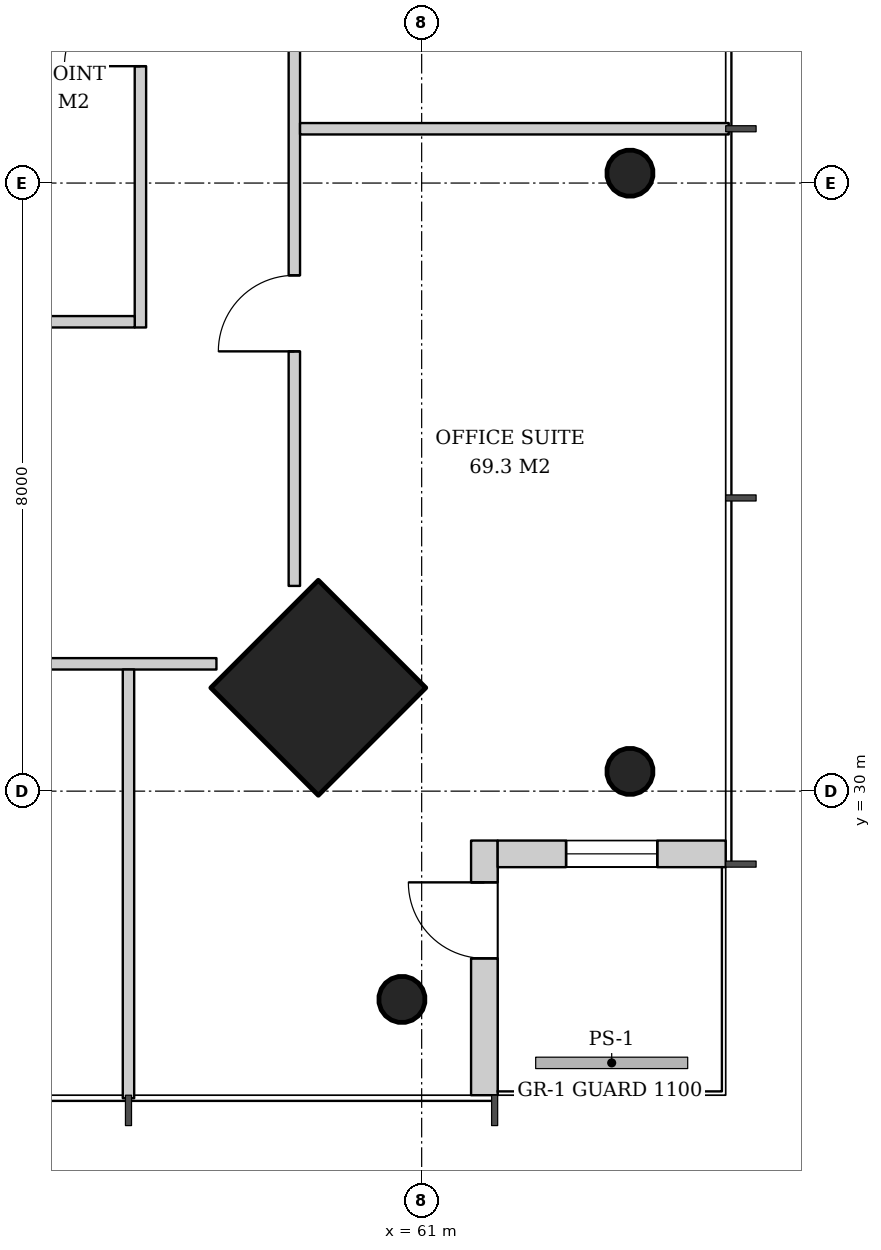
"""IFC4 building model, lengths in metres.
Left out: names, types, materials, properties, quantities, classifications, styles, units other than length and angle.
Written with IfcOpenShell. Run it as: python <this file> out.ifc"""

import sys

from ifc_helpers import new_model, si_unit, direction, frame, frame_2d, origin, origin_2d, place, context, subcontext, project, spatial, rectangle, hollow_circle, extrude, element, fill, save


model = new_model("IFC4")
c1 = context("Model", 3, precision=1e-05, world=origin(), true_north=direction((0.0, 1.0)))
c2 = subcontext(c1, "Body", "Model", "MODEL_VIEW")
j1 = project(units=[si_unit("LENGTHUNIT", "METRE"), si_unit("PLANEANGLEUNIT", "RADIAN")], contexts=[c1])
p1 = place(None, origin())
s1 = spatial("IfcSite", under=j1, at=p1, CompositionType="ELEMENT")
p2 = place(p1, origin())
s2 = spatial("IfcBuilding", under=s1, at=p2, CompositionType="ELEMENT")
p3 = place(p2, frame((0.0, 0.0, 184.4)))
s3 = spatial("IfcBuildingStorey", under=s2, at=p3, CompositionType="ELEMENT", Elevation=184.4)
p4 = place(p3, frame((63.779, 30.221, 0.0), z_axis=(-0.031898107953, 0.031898107953, 0.998981992539), x_axis=(-0.707106781187, -0.707106781187, 0.0)))
e1 = element("IfcColumn", 1, at=p4, inside=s3, PredefinedType="COLUMN", context=c2, shape_type="SweptSolid", body=[
    extrude(hollow_circle(Radius=0.305, WallThickness=0.025, at=origin_2d()), origin(), (0.0, 0.0, 1.0), 3.804),
])
p5 = place(p3, frame((63.779, 38.111, 0.0), z_axis=(-0.031910269556, 0.015987237665, 0.999362868496), x_axis=(-0.447933021895, -0.894067115991, 0.0)))
e2 = element("IfcColumn", 2, at=p5, inside=s3, PredefinedType="COLUMN", context=c2, shape_type="SweptSolid", body=[
    extrude(hollow_circle(Radius=0.305, WallThickness=0.025, at=origin_2d()), origin(), (0.0, 0.0, 1.0), 3.802),
])
p6 = place(p3, frame((59.678, 31.322, 0.0), z_axis=(-0.031898107953, 0.031898107953, 0.998981992539), x_axis=(-0.707106781187, -0.707106781187, 0.0)))
e3 = element("IfcColumn", 3, at=p6, inside=s3, PredefinedType="COLUMN", context=c2, shape_type="SweptSolid", body=[
    extrude(rectangle(XDim=2.0, YDim=2.0, at=origin_2d()), origin(), (0.0, 0.0, 1.0), 3.804),
])
p7 = place(p3, frame((60.779, 27.221, 0.0), z_axis=(-0.031898107953, 0.031898107953, 0.998981992539), x_axis=(-0.707106781187, -0.707106781187, 0.0)))
e4 = element("IfcColumn", 4, at=p7, inside=s3, PredefinedType="COLUMN", context=c2, shape_type="SweptSolid", body=[
    extrude(hollow_circle(Radius=0.305, WallThickness=0.025, at=origin_2d()), origin(), (0.0, 0.0, 1.0), 3.804),
])
p8 = place(p3, frame((61.825, 26.0, 0.0), z_axis=(0.0, 0.0, 1.0), x_axis=(0.0, 1.0, 0.0)))
e5 = element("IfcWall", 5, at=p8, inside=s3, PredefinedType="SOLIDWALL", context=c2, shape_type="SweptSolid", body=[
    extrude(rectangle(XDim=3.35, YDim=0.35, at=frame_2d((1.675, 0.0))), origin(), (0.0, 0.0, 1.0), 3.62),
])
p9 = place(p8, frame((1.8, 0.0, 0.0)))
e6 = element("IfcOpeningElement", 6, at=p9, cuts=e5, PredefinedType="OPENING", context=c2, shape_type="SweptSolid", body=[
    extrude(rectangle(XDim=1.0, YDim=2.4, at=frame_2d((0.5, 1.2))), frame((0.0, 0.185, 0.0), z_axis=(0.0, -1.0, 0.0), x_axis=(1.0, 0.0, 0.0)), (0.0, 0.0, 1.0), 0.37),
])
p10 = place(p3, frame((62.0, 29.175, 0.0), z_axis=(0.0, 0.0, 1.0), x_axis=(1.0, 0.0, 0.0)))
e7 = element("IfcWall", 7, at=p10, inside=s3, PredefinedType="SOLIDWALL", context=c2, shape_type="SweptSolid", body=[
    extrude(rectangle(XDim=3.0, YDim=0.35, at=frame_2d((1.5, 0.0))), origin(), (0.0, 0.0, 1.0), 3.62),
])
p11 = place(p10, frame((0.9, 0.0, 0.6)))
e8 = element("IfcOpeningElement", 8, at=p11, cuts=e7, PredefinedType="OPENING", context=c2, shape_type="SweptSolid", body=[
    extrude(rectangle(XDim=1.2, YDim=2.55, at=frame_2d((0.6, 1.275))), frame((0.0, 0.185, 0.0), z_axis=(0.0, -1.0, 0.0), x_axis=(1.0, 0.0, 0.0)), (0.0, 0.0, 1.0), 0.37),
])
p12 = place(p3, frame((57.3, 36.1, 0.0), z_axis=(0.0, 0.0, 1.0), x_axis=(0.0, 1.0, 0.0)))
e9 = element("IfcWall", 9, at=p12, inside=s3, PredefinedType="PARTITIONING", context=c2, shape_type="SweptSolid", body=[
    extrude(rectangle(XDim=7.875, YDim=0.15, at=frame_2d((3.938, 0.0))), origin(), (0.0, 0.0, 1.0), 2.867),
])
p13 = place(p12, frame((3.438, 0.0, 0.0)))
e10 = element("IfcOpeningElement", 10, at=p13, cuts=e9, PredefinedType="OPENING", context=c2, shape_type="SweptSolid", body=[
    extrude(rectangle(XDim=1.0, YDim=2.1, at=frame_2d((0.5, 1.05))), frame((0.0, 0.085, 0.0), z_axis=(0.0, -1.0, 0.0), x_axis=(1.0, 0.0, 0.0)), (0.0, 0.0, 1.0), 0.17),
])
p14 = place(p3, frame((54.9, 36.175, 0.0), z_axis=(0.0, 0.0, 1.0), x_axis=(1.0, 0.0, 0.0)))
e11 = element("IfcWall", 11, at=p14, inside=s3, PredefinedType="PARTITIONING", context=c2, shape_type="SweptSolid", body=[
    extrude(rectangle(XDim=2.325, YDim=0.15, at=frame_2d((1.163, 0.0))), origin(), (0.0, 0.0, 1.0), 2.867),
])
p15 = place(p3, frame((59.325, 32.7, 0.0), z_axis=(0.0, 0.0, 1.0), x_axis=(0.0, 1.0, 0.0)))
e12 = element("IfcWall", 12, at=p15, inside=s3, PredefinedType="PARTITIONING", context=c2, shape_type="SweptSolid", body=[
    extrude(rectangle(XDim=26.6, YDim=0.15, at=frame_2d((13.3, 0.0))), origin(), (0.0, 0.0, 1.0), 2.867),
])
p16 = place(p15, frame((3.086, 0.0, 0.0)))
e13 = element("IfcOpeningElement", 13, at=p16, cuts=e12, PredefinedType="OPENING", context=c2, shape_type="SweptSolid", body=[
    extrude(rectangle(XDim=1.0, YDim=2.1, at=frame_2d((0.5, 1.05))), frame((0.0, 0.085, 0.0), z_axis=(0.0, -1.0, 0.0), x_axis=(1.0, 0.0, 0.0)), (0.0, 0.0, 1.0), 0.17),
])
p17 = place(p15, frame((7.943, 0.0, 0.0)))
e14 = element("IfcOpeningElement", 14, at=p17, cuts=e12, PredefinedType="OPENING", context=c2, shape_type="SweptSolid", body=[
    extrude(rectangle(XDim=1.0, YDim=2.1, at=frame_2d((0.5, 1.05))), frame((0.0, 0.085, 0.0), z_axis=(0.0, -1.0, 0.0), x_axis=(1.0, 0.0, 0.0)), (0.0, 0.0, 1.0), 0.17),
])
p18 = place(p15, frame((12.8, 0.0, 0.0)))
e15 = element("IfcOpeningElement", 15, at=p18, cuts=e12, PredefinedType="OPENING", context=c2, shape_type="SweptSolid", body=[
    extrude(rectangle(XDim=1.0, YDim=2.1, at=frame_2d((0.5, 1.05))), frame((0.0, 0.085, 0.0), z_axis=(0.0, -1.0, 0.0), x_axis=(1.0, 0.0, 0.0)), (0.0, 0.0, 1.0), 0.17),
])
p19 = place(p15, frame((17.657, 0.0, 0.0)))
e16 = element("IfcOpeningElement", 16, at=p19, cuts=e12, PredefinedType="OPENING", context=c2, shape_type="SweptSolid", body=[
    extrude(rectangle(XDim=1.0, YDim=2.1, at=frame_2d((0.5, 1.05))), frame((0.0, 0.085, 0.0), z_axis=(0.0, -1.0, 0.0), x_axis=(1.0, 0.0, 0.0)), (0.0, 0.0, 1.0), 0.17),
])
p20 = place(p3, frame((59.4, 38.714, 0.0), z_axis=(0.0, 0.0, 1.0), x_axis=(1.0, 0.0, 0.0)))
e17 = element("IfcWall", 17, at=p20, inside=s3, PredefinedType="PARTITIONING", context=c2, shape_type="SweptSolid", body=[
    extrude(rectangle(XDim=5.64, YDim=0.15, at=frame_2d((2.82, 0.0))), origin(), (0.0, 0.0, 1.0), 3.12),
])
p21 = place(p3, frame((31.7, 31.675, 0.0), z_axis=(0.0, 0.0, 1.0), x_axis=(1.0, 0.0, 0.0)))
e18 = element("IfcWall", 18, at=p21, inside=s3, PredefinedType="PARTITIONING", context=c2, shape_type="SweptSolid", body=[
    extrude(rectangle(XDim=26.6, YDim=0.15, at=frame_2d((13.3, 0.0))), origin(), (0.0, 0.0, 1.0), 2.867),
])
p22 = place(p21, frame((3.086, 0.0, 0.0)))
e19 = element("IfcOpeningElement", 19, at=p22, cuts=e18, PredefinedType="OPENING", context=c2, shape_type="SweptSolid", body=[
    extrude(rectangle(XDim=1.0, YDim=2.1, at=frame_2d((0.5, 1.05))), frame((0.0, 0.085, 0.0), z_axis=(0.0, -1.0, 0.0), x_axis=(1.0, 0.0, 0.0)), (0.0, 0.0, 1.0), 0.17),
])
p23 = place(p21, frame((7.943, 0.0, 0.0)))
e20 = element("IfcOpeningElement", 20, at=p23, cuts=e18, PredefinedType="OPENING", context=c2, shape_type="SweptSolid", body=[
    extrude(rectangle(XDim=1.0, YDim=2.1, at=frame_2d((0.5, 1.05))), frame((0.0, 0.085, 0.0), z_axis=(0.0, -1.0, 0.0), x_axis=(1.0, 0.0, 0.0)), (0.0, 0.0, 1.0), 0.17),
])
p24 = place(p21, frame((12.8, 0.0, 0.0)))
e21 = element("IfcOpeningElement", 21, at=p24, cuts=e18, PredefinedType="OPENING", context=c2, shape_type="SweptSolid", body=[
    extrude(rectangle(XDim=1.0, YDim=2.1, at=frame_2d((0.5, 1.05))), frame((0.0, 0.085, 0.0), z_axis=(0.0, -1.0, 0.0), x_axis=(1.0, 0.0, 0.0)), (0.0, 0.0, 1.0), 0.17),
])
p25 = place(p21, frame((17.657, 0.0, 0.0)))
e22 = element("IfcOpeningElement", 22, at=p25, cuts=e18, PredefinedType="OPENING", context=c2, shape_type="SweptSolid", body=[
    extrude(rectangle(XDim=1.0, YDim=2.1, at=frame_2d((0.5, 1.05))), frame((0.0, 0.085, 0.0), z_axis=(0.0, -1.0, 0.0), x_axis=(1.0, 0.0, 0.0)), (0.0, 0.0, 1.0), 0.17),
])
p26 = place(p21, frame((22.514, 0.0, 0.0)))
e23 = element("IfcOpeningElement", 23, at=p26, cuts=e18, PredefinedType="OPENING", context=c2, shape_type="SweptSolid", body=[
    extrude(rectangle(XDim=1.0, YDim=2.1, at=frame_2d((0.5, 1.05))), frame((0.0, 0.085, 0.0), z_axis=(0.0, -1.0, 0.0), x_axis=(1.0, 0.0, 0.0)), (0.0, 0.0, 1.0), 0.17),
])
p27 = place(p3, frame((57.143, 31.6, 0.0), z_axis=(0.0, 0.0, 1.0), x_axis=(0.0, -1.0, 0.0)))
e24 = element("IfcWall", 24, at=p27, inside=s3, PredefinedType="PARTITIONING", context=c2, shape_type="SweptSolid", body=[
    extrude(rectangle(XDim=5.64, YDim=0.15, at=frame_2d((2.82, 0.0))), origin(), (0.0, 0.0, 1.0), 3.12),
])
p28 = place(p9, origin())
e25 = element("IfcDoor", 25, at=p28, inside=s3, OperationType="SINGLE_SWING_RIGHT", PredefinedType="DOOR", context=c2, shape_type="SweptSolid", body=[
    extrude(rectangle(XDim=1.0, YDim=2.4, at=frame_2d((0.5, 1.2))), frame((0.0, 0.025, 0.0), z_axis=(0.0, -1.0, 0.0), x_axis=(1.0, 0.0, 0.0)), (0.0, 0.0, 1.0), 0.05),
])
fill(e6, e25)
p29 = place(p11, origin())
e26 = element("IfcWindow", 26, at=p29, inside=s3, PartitioningType="SINGLE_PANEL", PredefinedType="WINDOW", context=c2, shape_type="SweptSolid", body=[
    extrude(rectangle(XDim=1.2, YDim=2.55, at=frame_2d((0.6, 1.275))), frame((0.0, 0.03, 0.0), z_axis=(0.0, -1.0, 0.0), x_axis=(1.0, 0.0, 0.0)), (0.0, 0.0, 1.0), 0.06),
])
fill(e8, e26)
p30 = place(p13, origin())
e27 = element("IfcDoor", 27, at=p30, inside=s3, OperationType="SINGLE_SWING_LEFT", PredefinedType="DOOR", context=c2, shape_type="SweptSolid", body=[
    extrude(rectangle(XDim=1.0, YDim=2.1, at=frame_2d((0.5, 1.05))), frame((0.0, 0.025, 0.0), z_axis=(0.0, -1.0, 0.0), x_axis=(1.0, 0.0, 0.0)), (0.0, 0.0, 1.0), 0.05),
])
fill(e10, e27)
p31 = place(p16, origin())
e28 = element("IfcDoor", 28, at=p31, inside=s3, OperationType="SINGLE_SWING_LEFT", PredefinedType="DOOR", context=c2, shape_type="SweptSolid", body=[
    extrude(rectangle(XDim=1.0, YDim=2.1, at=frame_2d((0.5, 1.05))), frame((0.0, 0.025, 0.0), z_axis=(0.0, -1.0, 0.0), x_axis=(1.0, 0.0, 0.0)), (0.0, 0.0, 1.0), 0.05),
])
fill(e13, e28)
save(model, sys.argv[1])
